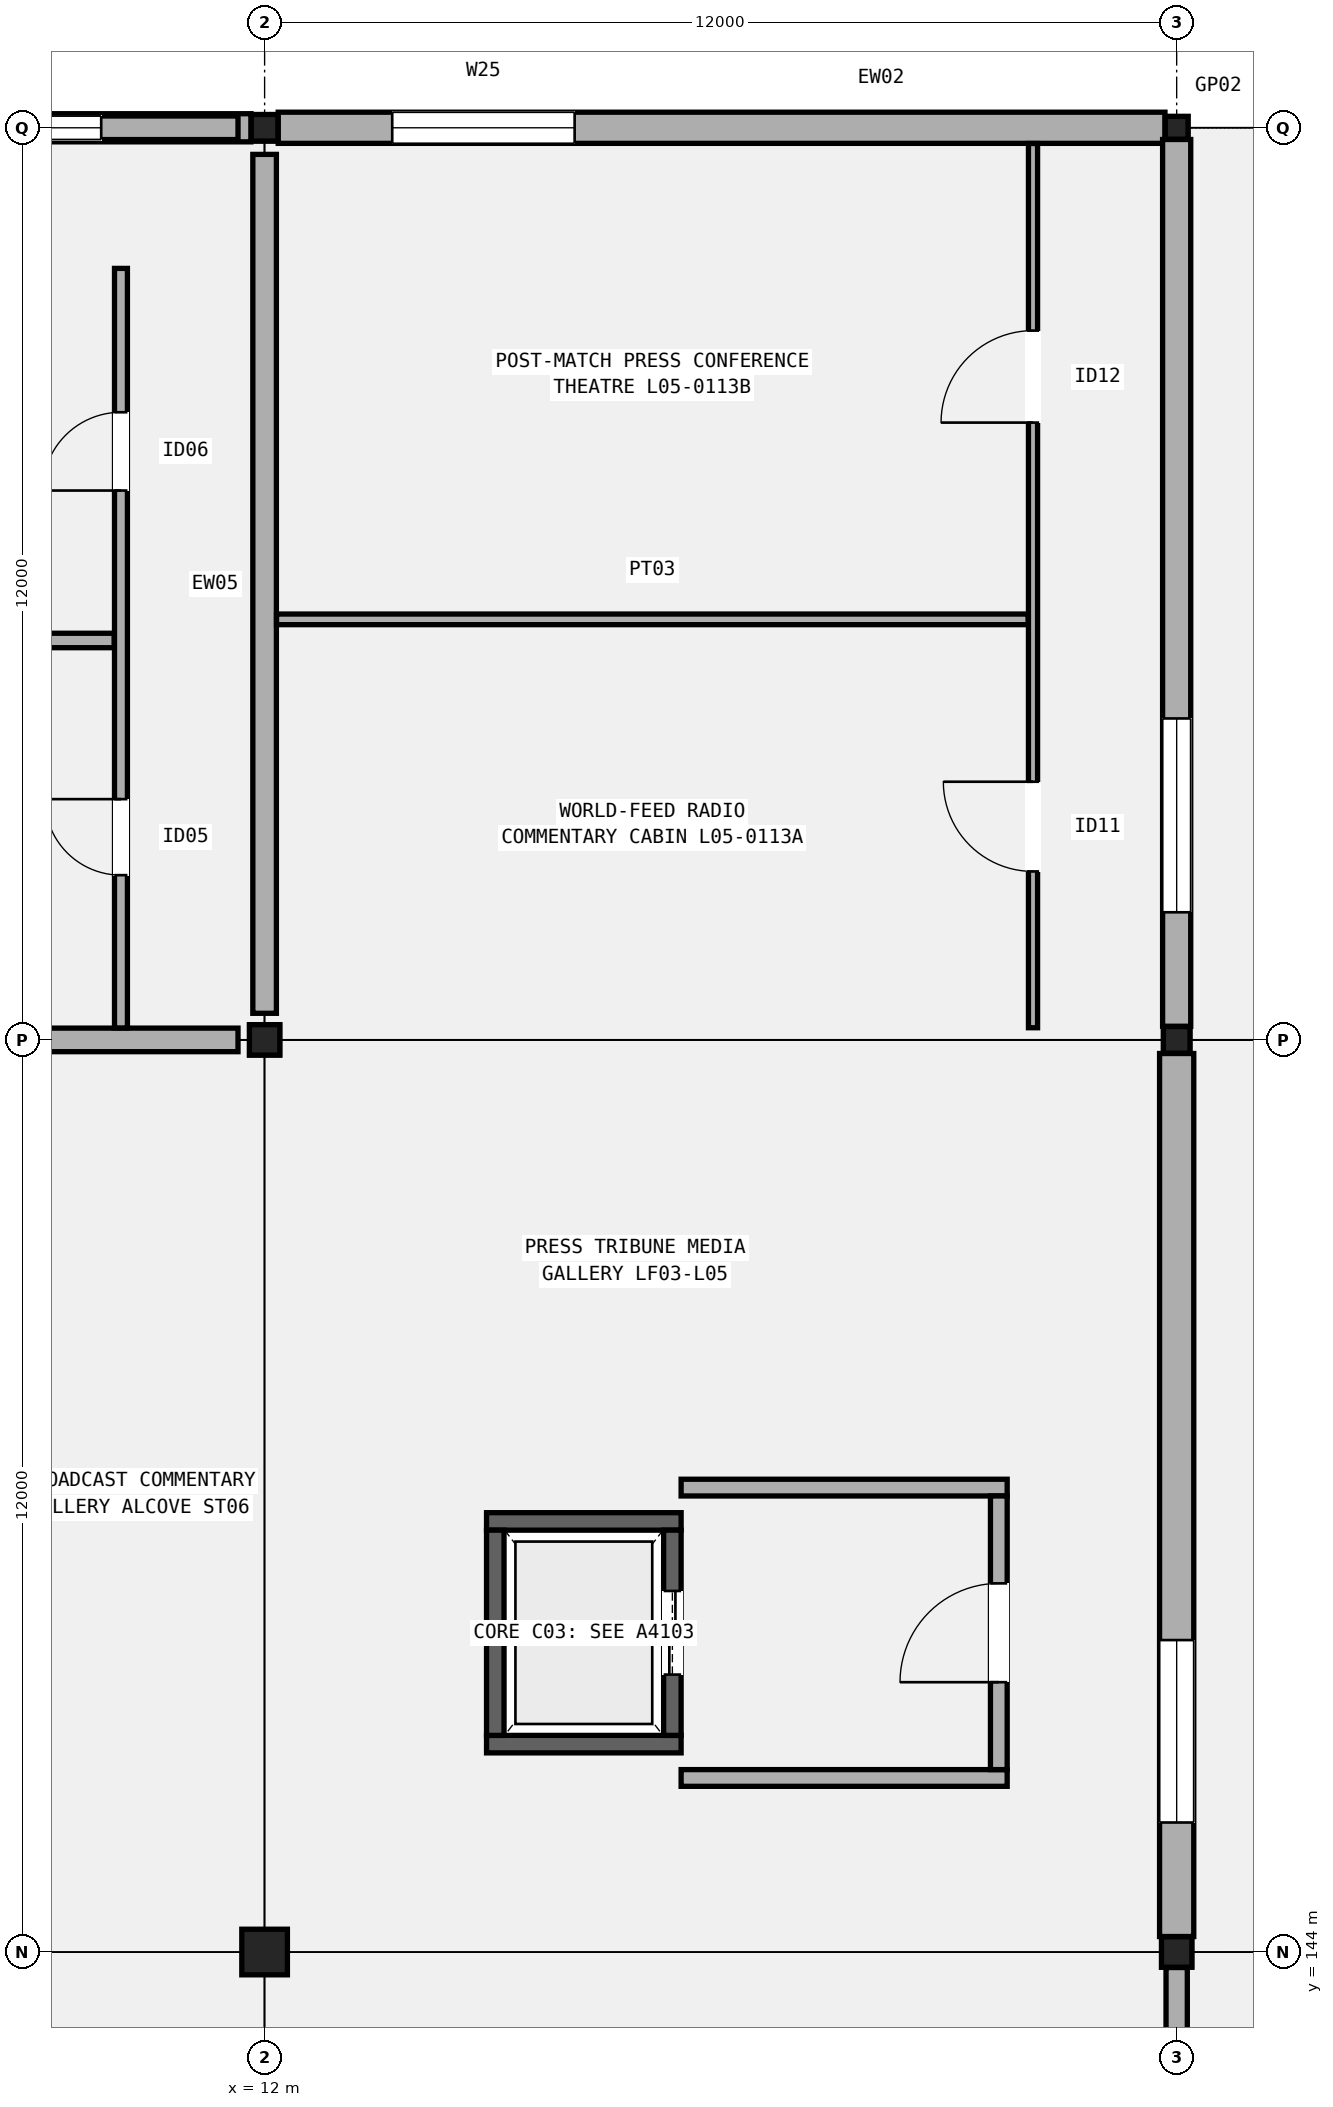
"""IFC4 building model, lengths in metres.
Left out: names, types, materials, properties, quantities, classifications, styles, units other than length and angle.
Written with IfcOpenShell. Run it as: python <this file> out.ifc"""

import sys

from ifc_helpers import new_model, si_unit, direction, frame, frame_2d, origin, origin_2d, place, context, subcontext, project, spatial, rectangle, hollow_rectangle, extrude, element, fill, save


model = new_model("IFC4")
c1 = context("Model", 3, precision=1e-05, world=origin(), true_north=direction((0.0, 1.0)))
c2 = subcontext(c1, "Body", "Model", "MODEL_VIEW")
j1 = project(units=[si_unit("LENGTHUNIT", "METRE"), si_unit("PLANEANGLEUNIT", "RADIAN")], contexts=[c1])
p1 = place(None, origin())
s1 = spatial("IfcSite", under=j1, at=p1, CompositionType="ELEMENT")
p2 = place(p1, origin())
s2 = spatial("IfcBuilding", under=s1, at=p2, CompositionType="ELEMENT")
p3 = place(p2, frame((0.0, 0.0, 25.8)))
s3 = spatial("IfcBuildingStorey", under=s2, at=p3, CompositionType="ELEMENT", Elevation=25.8)
p4 = place(p3, frame((12.0, 144.0, 0.0), z_axis=(0.0, 0.0, 1.0), x_axis=(1.0, 0.0, 0.0)))
e1 = element("IfcColumn", 1, at=p4, inside=s3, PredefinedType="COLUMN", context=c2, shape_type="SweptSolid", body=[
    extrude(rectangle(XDim=0.6, YDim=0.6, at=origin_2d()), origin(), (0.0, 0.0, 1.0), 5.4),
])
p5 = place(p3, frame((12.0, 156.0, 0.0), z_axis=(0.0, 0.0, 1.0), x_axis=(1.0, 0.0, 0.0)))
e2 = element("IfcColumn", 2, at=p5, inside=s3, PredefinedType="COLUMN", context=c2, shape_type="SweptSolid", body=[
    extrude(hollow_rectangle(XDim=0.4, YDim=0.4, WallThickness=0.016, InnerFilletRadius=0.016, OuterFilletRadius=0.032, at=origin_2d()), origin(), (0.0, 0.0, 1.0), 5.4),
])
p6 = place(p3, frame((12.0, 168.0, 0.0), z_axis=(0.0, 0.0, 1.0), x_axis=(1.0, 0.0, 0.0)))
e3 = element("IfcColumn", 3, at=p6, inside=s3, PredefinedType="COLUMN", context=c2, shape_type="SweptSolid", body=[
    extrude(hollow_rectangle(XDim=0.35, YDim=0.35, WallThickness=0.016, InnerFilletRadius=0.016, OuterFilletRadius=0.032, at=origin_2d()), origin(), (0.0, 0.0, 1.0), 5.4),
])
p7 = place(p3, frame((24.0, 144.0, 0.0), z_axis=(0.0, 0.0, 1.0), x_axis=(1.0, 0.0, 0.0)))
e4 = element("IfcColumn", 4, at=p7, inside=s3, PredefinedType="COLUMN", context=c2, shape_type="SweptSolid", body=[
    extrude(hollow_rectangle(XDim=0.4, YDim=0.4, WallThickness=0.016, InnerFilletRadius=0.016, OuterFilletRadius=0.032, at=origin_2d()), origin(), (0.0, 0.0, 1.0), 5.4),
])
p8 = place(p3, frame((24.0, 156.0, 0.0), z_axis=(0.0, 0.0, 1.0), x_axis=(1.0, 0.0, 0.0)))
e5 = element("IfcColumn", 5, at=p8, inside=s3, PredefinedType="COLUMN", context=c2, shape_type="SweptSolid", body=[
    extrude(hollow_rectangle(XDim=0.35, YDim=0.35, WallThickness=0.016, InnerFilletRadius=0.016, OuterFilletRadius=0.032, at=origin_2d()), origin(), (0.0, 0.0, 1.0), 5.4),
])
p9 = place(p3, frame((24.0, 168.0, 0.0), z_axis=(0.0, 0.0, 1.0), x_axis=(1.0, 0.0, 0.0)))
e6 = element("IfcColumn", 6, at=p9, inside=s3, PredefinedType="COLUMN", context=c2, shape_type="SweptSolid", body=[
    extrude(hollow_rectangle(XDim=0.3, YDim=0.3, WallThickness=0.012, InnerFilletRadius=0.012, OuterFilletRadius=0.024, at=origin_2d()), origin(), (0.0, 0.0, 1.0), 5.4),
])
p10 = place(p3, frame((0.204, 168.0, 0.0), z_axis=(0.0, 0.0, 1.0), x_axis=(1.0, 0.0, 0.0)))
e7 = element("IfcWall", 7, at=p10, inside=s3, PredefinedType="SOLIDWALL", context=c2, shape_type="SweptSolid", body=[
    extrude(rectangle(XDim=11.617, YDim=0.37, at=frame_2d((5.809, 0.0))), origin(), (0.0, 0.0, 1.0), 4.452),
])
p11 = place(p10, frame((1.5, 0.0, 0.95)))
e8 = element("IfcOpeningElement", 8, at=p11, cuts=e7, PredefinedType="OPENING", context=c2, shape_type="SweptSolid", body=[
    extrude(rectangle(XDim=1.35, YDim=2.4, at=frame_2d((0.675, 1.2))), frame((0.0, 0.195, 0.0), z_axis=(0.0, -1.0, 0.0), x_axis=(1.0, 0.0, 0.0)), (0.0, 0.0, 1.0), 0.39),
])
p12 = place(p3, frame((24.0, 132.304, 0.0), z_axis=(0.0, 0.0, 1.0), x_axis=(0.0, 1.0, 0.0)))
e9 = element("IfcWall", 9, at=p12, inside=s3, PredefinedType="SOLIDWALL", context=c2, shape_type="SweptSolid", body=[
    extrude(rectangle(XDim=11.492, YDim=0.28, at=frame_2d((5.746, 0.0))), origin(), (0.0, 0.0, 1.0), 4.13),
])
p13 = place(p12, frame((1.5, 0.0, 0.95)))
e10 = element("IfcOpeningElement", 10, at=p13, cuts=e9, PredefinedType="OPENING", context=c2, shape_type="SweptSolid", body=[
    extrude(rectangle(XDim=2.4, YDim=1.65, at=frame_2d((1.2, 0.825))), frame((0.0, 0.15, 0.0), z_axis=(0.0, -1.0, 0.0), x_axis=(1.0, 0.0, 0.0)), (0.0, 0.0, 1.0), 0.3),
])
p14 = place(p3, frame((24.0, 144.204, 0.0), z_axis=(0.0, 0.0, 1.0), x_axis=(0.0, 1.0, 0.0)))
e11 = element("IfcWall", 11, at=p14, inside=s3, PredefinedType="SOLIDWALL", context=c2, shape_type="SweptSolid", body=[
    extrude(rectangle(XDim=11.617, YDim=0.45, at=frame_2d((5.809, 0.0))), origin(), (0.0, 0.0, 1.0), 4.452),
])
p15 = place(p14, frame((1.5, 0.0, 0.95)))
e12 = element("IfcOpeningElement", 12, at=p15, cuts=e11, PredefinedType="OPENING", context=c2, shape_type="SweptSolid", body=[
    extrude(rectangle(XDim=2.4, YDim=2.05, at=frame_2d((1.2, 1.025))), frame((0.0, 0.235, 0.0), z_axis=(0.0, -1.0, 0.0), x_axis=(1.0, 0.0, 0.0)), (0.0, 0.0, 1.0), 0.47),
])
p16 = place(p3, frame((12.179, 168.0, 0.0), z_axis=(0.0, 0.0, 1.0), x_axis=(1.0, 0.0, 0.0)))
e13 = element("IfcWall", 13, at=p16, inside=s3, PredefinedType="SOLIDWALL", context=c2, shape_type="SweptSolid", body=[
    extrude(rectangle(XDim=11.667, YDim=0.41, at=frame_2d((5.833, 0.0))), origin(), (0.0, 0.0, 1.0), 4.34),
])
p17 = place(p16, frame((1.5, 0.0, 0.95)))
e14 = element("IfcOpeningElement", 14, at=p17, cuts=e13, PredefinedType="OPENING", context=c2, shape_type="SweptSolid", body=[
    extrude(rectangle(XDim=2.4, YDim=2.45, at=frame_2d((1.2, 1.225))), frame((0.0, 0.215, 0.0), z_axis=(0.0, -1.0, 0.0), x_axis=(1.0, 0.0, 0.0)), (0.0, 0.0, 1.0), 0.43),
])
p18 = place(p3, frame((24.0, 156.179, 0.0), z_axis=(0.0, 0.0, 1.0), x_axis=(0.0, 1.0, 0.0)))
e15 = element("IfcWall", 15, at=p18, inside=s3, PredefinedType="SOLIDWALL", context=c2, shape_type="SweptSolid", body=[
    extrude(rectangle(XDim=11.667, YDim=0.37, at=frame_2d((5.833, 0.0))), origin(), (0.0, 0.0, 1.0), 4.34),
])
p19 = place(p18, frame((1.5, 0.0, 0.95)))
e16 = element("IfcOpeningElement", 16, at=p19, cuts=e15, PredefinedType="OPENING", context=c2, shape_type="SweptSolid", body=[
    extrude(rectangle(XDim=2.55, YDim=1.95, at=frame_2d((1.275, 0.975))), frame((0.0, 0.195, 0.0), z_axis=(0.0, -1.0, 0.0), x_axis=(1.0, 0.0, 0.0)), (0.0, 0.0, 1.0), 0.39),
])
p20 = place(p3, frame((0.35, 156.0, 7.7), z_axis=(0.0, 0.0, 1.0), x_axis=(1.0, 0.0, 0.0)))
e17 = element("IfcWall", 17, at=p20, inside=s3, PredefinedType="SOLIDWALL", context=c2, shape_type="SweptSolid", body=[
    extrude(rectangle(XDim=11.3, YDim=0.31, at=frame_2d((5.65, 0.0))), origin(), (0.0, 0.0, 1.0), 1.58),
])
p21 = place(p3, frame((0.35, 168.0, 7.7), z_axis=(0.0, 0.0, 1.0), x_axis=(1.0, 0.0, 0.0)))
e18 = element("IfcWall", 18, at=p21, inside=s3, PredefinedType="SOLIDWALL", context=c2, shape_type="SweptSolid", body=[
    extrude(rectangle(XDim=11.3, YDim=0.31, at=frame_2d((5.65, 0.0))), origin(), (0.0, 0.0, 1.0), 1.58),
])
p22 = place(p21, frame((1.8, 0.0, 0.12)))
e19 = element("IfcOpeningElement", 19, at=p22, cuts=e18, PredefinedType="OPENING", context=c2, shape_type="SweptSolid", body=[
    extrude(rectangle(XDim=1.2, YDim=1.3, at=frame_2d((0.6, 0.65))), frame((0.0, 0.165, 0.0), z_axis=(0.0, -1.0, 0.0), x_axis=(1.0, 0.0, 0.0)), (0.0, 0.0, 1.0), 0.33),
])
p23 = place(p21, frame((8.3, 0.0, 0.12)))
e20 = element("IfcOpeningElement", 20, at=p23, cuts=e18, PredefinedType="OPENING", context=c2, shape_type="SweptSolid", body=[
    extrude(rectangle(XDim=1.2, YDim=1.3, at=frame_2d((0.6, 0.65))), frame((0.0, 0.165, 0.0), z_axis=(0.0, -1.0, 0.0), x_axis=(1.0, 0.0, 0.0)), (0.0, 0.0, 1.0), 0.33),
])
p24 = place(p3, frame((12.0, 156.35, 7.7), z_axis=(0.0, 0.0, 1.0), x_axis=(0.0, 1.0, 0.0)))
e21 = element("IfcWall", 21, at=p24, inside=s3, PredefinedType="SOLIDWALL", context=c2, shape_type="SweptSolid", body=[
    extrude(rectangle(XDim=11.3, YDim=0.31, at=frame_2d((5.65, 0.0))), origin(), (0.0, 0.0, 1.0), 1.58),
])
for number, where, z_axis, x_axis in (
    (22, (14.92, 146.735, 0.0), (0.0, 0.0, 1.0), (1.0, 0.0, 0.0)),
    (23, (14.92, 149.665, 0.0), (0.0, 0.0, 1.0), (1.0, 0.0, 0.0)),
):
    element("IfcWall", number, at=place(p3, frame(where, z_axis=z_axis, x_axis=x_axis)), inside=s3, PredefinedType="SHEAR", context=c2, shape_type="SweptSolid", body=[
        extrude(rectangle(XDim=2.56, YDim=0.23, at=frame_2d((1.28, 0.0))), origin(), (0.0, 0.0, 1.0), 5.04),
    ])
p25 = place(p3, frame((15.035, 146.85, 0.0), z_axis=(0.0, 0.0, 1.0), x_axis=(0.0, 1.0, 0.0)))
e24 = element("IfcWall", 24, at=p25, inside=s3, PredefinedType="SHEAR", context=c2, shape_type="SweptSolid", body=[
    extrude(rectangle(XDim=2.7, YDim=0.23, at=frame_2d((1.35, 0.0))), origin(), (0.0, 0.0, 1.0), 5.04),
])
p26 = place(p3, frame((17.365, 146.85, 0.0), z_axis=(0.0, 0.0, 1.0), x_axis=(0.0, 1.0, 0.0)))
e25 = element("IfcWall", 25, at=p26, inside=s3, PredefinedType="SHEAR", context=c2, shape_type="SweptSolid", body=[
    extrude(rectangle(XDim=2.7, YDim=0.23, at=frame_2d((1.35, 0.0))), origin(), (0.0, 0.0, 1.0), 5.04),
])
p27 = place(p26, frame((0.8, 0.0, 0.0)))
e26 = element("IfcOpeningElement", 26, at=p27, cuts=e25, PredefinedType="OPENING", context=c2, shape_type="SweptSolid", body=[
    extrude(rectangle(XDim=1.1, YDim=2.15, at=frame_2d((0.55, 1.075))), frame((0.0, 0.125, 0.0), z_axis=(0.0, -1.0, 0.0), x_axis=(1.0, 0.0, 0.0)), (0.0, 0.0, 1.0), 0.25),
])
for number, where, z_axis, x_axis in (
    (27, (17.48, 146.29, 0.0), (0.0, 0.0, 1.0), (1.0, 0.0, 0.0)),
    (28, (17.48, 150.11, 0.0), (0.0, 0.0, 1.0), (1.0, 0.0, 0.0)),
):
    element("IfcWall", number, at=place(p3, frame(where, z_axis=z_axis, x_axis=x_axis)), inside=s3, PredefinedType="SOLIDWALL", context=c2, shape_type="SweptSolid", body=[
        extrude(rectangle(XDim=4.29, YDim=0.22, at=frame_2d((2.145, 0.0))), origin(), (0.0, 0.0, 1.0), 4.35),
    ])
p28 = place(p3, frame((21.66, 146.4, 0.0), z_axis=(0.0, 0.0, 1.0), x_axis=(0.0, 1.0, 0.0)))
e29 = element("IfcWall", 29, at=p28, inside=s3, PredefinedType="SOLIDWALL", context=c2, shape_type="SweptSolid", body=[
    extrude(rectangle(XDim=3.6, YDim=0.22, at=frame_2d((1.8, 0.0))), origin(), (0.0, 0.0, 1.0), 4.35),
])
p29 = place(p28, frame((1.15, 0.0, 0.0)))
e30 = element("IfcOpeningElement", 30, at=p29, cuts=e29, PredefinedType="OPENING", context=c2, shape_type="SweptSolid", body=[
    extrude(rectangle(XDim=1.3, YDim=2.15, at=frame_2d((0.65, 1.075))), frame((0.0, 0.12, 0.0), z_axis=(0.0, -1.0, 0.0), x_axis=(1.0, 0.0, 0.0)), (0.0, 0.0, 1.0), 0.24),
])
p30 = place(p3, frame((10.11, 156.157, 0.0), z_axis=(0.0, 0.0, 1.0), x_axis=(0.0, 1.0, 0.0)))
e31 = element("IfcWall", 31, at=p30, inside=s3, PredefinedType="PARTITIONING", context=c2, shape_type="SweptSolid", body=[
    extrude(rectangle(XDim=9.993, YDim=0.17, at=frame_2d((4.997, 0.0))), origin(), (0.0, 0.0, 1.0), 4.35),
])
p31 = place(p30, frame((2.01, 0.0, 0.0)))
e32 = element("IfcOpeningElement", 32, at=p31, cuts=e31, PredefinedType="OPENING", context=c2, shape_type="SweptSolid", body=[
    extrude(rectangle(XDim=1.0, YDim=2.14, at=frame_2d((0.5, 1.07))), frame((0.0, 0.095, 0.0), z_axis=(0.0, -1.0, 0.0), x_axis=(1.0, 0.0, 0.0)), (0.0, 0.0, 1.0), 0.19),
])
p32 = place(p30, frame((7.071, 0.0, 0.0)))
e33 = element("IfcOpeningElement", 33, at=p32, cuts=e31, PredefinedType="OPENING", context=c2, shape_type="SweptSolid", body=[
    extrude(rectangle(XDim=1.03, YDim=2.12, at=frame_2d((0.515, 1.06))), frame((0.0, 0.095, 0.0), z_axis=(0.0, -1.0, 0.0), x_axis=(1.0, 0.0, 0.0)), (0.0, 0.0, 1.0), 0.19),
])
p33 = place(p3, frame((1.75, 161.255, 0.0), z_axis=(0.0, 0.0, 1.0), x_axis=(1.0, 0.0, 0.0)))
e34 = element("IfcWall", 34, at=p33, inside=s3, PredefinedType="PARTITIONING", context=c2, shape_type="SweptSolid", body=[
    extrude(rectangle(XDim=8.27, YDim=0.19, at=frame_2d((4.135, 0.0))), origin(), (0.0, 0.0, 1.0), 4.35),
])
p34 = place(p3, frame((22.11, 156.16, 0.0), z_axis=(0.0, 0.0, 1.0), x_axis=(0.0, 1.0, 0.0)))
e35 = element("IfcWall", 35, at=p34, inside=s3, PredefinedType="PARTITIONING", context=c2, shape_type="SweptSolid", body=[
    extrude(rectangle(XDim=11.633, YDim=0.12, at=frame_2d((5.816, 0.0))), origin(), (0.0, 0.0, 1.0), 4.35),
])
p35 = place(p34, frame((2.056, 0.0, 0.0)))
e36 = element("IfcOpeningElement", 36, at=p35, cuts=e35, PredefinedType="OPENING", context=c2, shape_type="SweptSolid", body=[
    extrude(rectangle(XDim=1.18, YDim=2.2, at=frame_2d((0.59, 1.1))), frame((0.0, 0.07, 0.0), z_axis=(0.0, -1.0, 0.0), x_axis=(1.0, 0.0, 0.0)), (0.0, 0.0, 1.0), 0.14),
])
p36 = place(p34, frame((7.961, 0.0, 0.0)))
e37 = element("IfcOpeningElement", 37, at=p36, cuts=e35, PredefinedType="OPENING", context=c2, shape_type="SweptSolid", body=[
    extrude(rectangle(XDim=1.21, YDim=2.18, at=frame_2d((0.605, 1.09))), frame((0.0, 0.07, 0.0), z_axis=(0.0, -1.0, 0.0), x_axis=(1.0, 0.0, 0.0)), (0.0, 0.0, 1.0), 0.14),
])
p37 = place(p3, frame((12.157, 161.533, 0.0), z_axis=(0.0, 0.0, 1.0), x_axis=(1.0, 0.0, 0.0)))
e38 = element("IfcWall", 38, at=p37, inside=s3, PredefinedType="PARTITIONING", context=c2, shape_type="SweptSolid", body=[
    extrude(rectangle(XDim=9.888, YDim=0.14, at=frame_2d((4.944, 0.0))), origin(), (0.0, 0.0, 1.0), 4.35),
])
p38 = place(p15, origin())
e39 = element("IfcWindow", 39, at=p38, inside=s3, PartitioningType="SINGLE_PANEL", PredefinedType="WINDOW", context=c2, shape_type="SweptSolid", body=[
    extrude(rectangle(XDim=2.4, YDim=2.05, at=frame_2d((1.2, 1.025))), frame((0.0, 0.03, 0.0), z_axis=(0.0, -1.0, 0.0), x_axis=(1.0, 0.0, 0.0)), (0.0, 0.0, 1.0), 0.06),
])
fill(e12, e39)
p39 = place(p17, origin())
e40 = element("IfcWindow", 40, at=p39, inside=s3, PartitioningType="SINGLE_PANEL", PredefinedType="WINDOW", context=c2, shape_type="SweptSolid", body=[
    extrude(rectangle(XDim=2.4, YDim=2.45, at=frame_2d((1.2, 1.225))), frame((0.0, 0.03, 0.0), z_axis=(0.0, -1.0, 0.0), x_axis=(1.0, 0.0, 0.0)), (0.0, 0.0, 1.0), 0.06),
])
fill(e14, e40)
p40 = place(p19, origin())
e41 = element("IfcWindow", 41, at=p40, inside=s3, PartitioningType="SINGLE_PANEL", PredefinedType="WINDOW", context=c2, shape_type="SweptSolid", body=[
    extrude(rectangle(XDim=2.55, YDim=1.95, at=frame_2d((1.275, 0.975))), frame((0.0, 0.03, 0.0), z_axis=(0.0, -1.0, 0.0), x_axis=(1.0, 0.0, 0.0)), (0.0, 0.0, 1.0), 0.06),
])
fill(e16, e41)
p41 = place(p23, origin())
e42 = element("IfcWindow", 42, at=p41, inside=s3, PartitioningType="SINGLE_PANEL", PredefinedType="WINDOW", context=c2, shape_type="SweptSolid", body=[
    extrude(rectangle(XDim=1.2, YDim=1.3, at=frame_2d((0.6, 0.65))), frame((0.0, 0.03, 0.0), z_axis=(0.0, -1.0, 0.0), x_axis=(1.0, 0.0, 0.0)), (0.0, 0.0, 1.0), 0.06),
])
fill(e20, e42)
p42 = place(p27, origin())
e43 = element("IfcDoor", 43, at=p42, inside=s3, OperationType="DOUBLE_DOOR_SLIDING", PredefinedType="DOOR", context=c2, shape_type="SweptSolid", body=[
    extrude(rectangle(XDim=1.1, YDim=2.15, at=frame_2d((0.55, 1.075))), frame((0.0, 0.025, 0.0), z_axis=(0.0, -1.0, 0.0), x_axis=(1.0, 0.0, 0.0)), (0.0, 0.0, 1.0), 0.05),
])
fill(e26, e43)
p43 = place(p29, origin())
e44 = element("IfcDoor", 44, at=p43, inside=s3, OperationType="SINGLE_SWING_LEFT", PredefinedType="DOOR", context=c2, shape_type="SweptSolid", body=[
    extrude(rectangle(XDim=1.3, YDim=2.15, at=frame_2d((0.65, 1.075))), frame((0.0, 0.025, 0.0), z_axis=(0.0, -1.0, 0.0), x_axis=(1.0, 0.0, 0.0)), (0.0, 0.0, 1.0), 0.05),
])
fill(e30, e44)
p44 = place(p31, origin())
e45 = element("IfcDoor", 45, at=p44, inside=s3, OperationType="SINGLE_SWING_RIGHT", PredefinedType="DOOR", context=c2, shape_type="SweptSolid", body=[
    extrude(rectangle(XDim=1.0, YDim=2.14, at=frame_2d((0.5, 1.07))), frame((0.0, 0.025, 0.0), z_axis=(0.0, -1.0, 0.0), x_axis=(1.0, 0.0, 0.0)), (0.0, 0.0, 1.0), 0.05),
])
fill(e32, e45)
p45 = place(p32, origin())
e46 = element("IfcDoor", 46, at=p45, inside=s3, OperationType="SINGLE_SWING_LEFT", PredefinedType="DOOR", context=c2, shape_type="SweptSolid", body=[
    extrude(rectangle(XDim=1.03, YDim=2.12, at=frame_2d((0.515, 1.06))), frame((0.0, 0.025, 0.0), z_axis=(0.0, -1.0, 0.0), x_axis=(1.0, 0.0, 0.0)), (0.0, 0.0, 1.0), 0.05),
])
fill(e33, e46)
p46 = place(p35, origin())
e47 = element("IfcDoor", 47, at=p46, inside=s3, OperationType="SINGLE_SWING_RIGHT", PredefinedType="DOOR", context=c2, shape_type="SweptSolid", body=[
    extrude(rectangle(XDim=1.18, YDim=2.2, at=frame_2d((0.59, 1.1))), frame((0.0, 0.025, 0.0), z_axis=(0.0, -1.0, 0.0), x_axis=(1.0, 0.0, 0.0)), (0.0, 0.0, 1.0), 0.05),
])
fill(e36, e47)
p47 = place(p36, origin())
e48 = element("IfcDoor", 48, at=p47, inside=s3, OperationType="SINGLE_SWING_LEFT", PredefinedType="DOOR", context=c2, shape_type="SweptSolid", body=[
    extrude(rectangle(XDim=1.21, YDim=2.18, at=frame_2d((0.605, 1.09))), frame((0.0, 0.025, 0.0), z_axis=(0.0, -1.0, 0.0), x_axis=(1.0, 0.0, 0.0)), (0.0, 0.0, 1.0), 0.05),
])
fill(e37, e48)
save(model, sys.argv[1])
